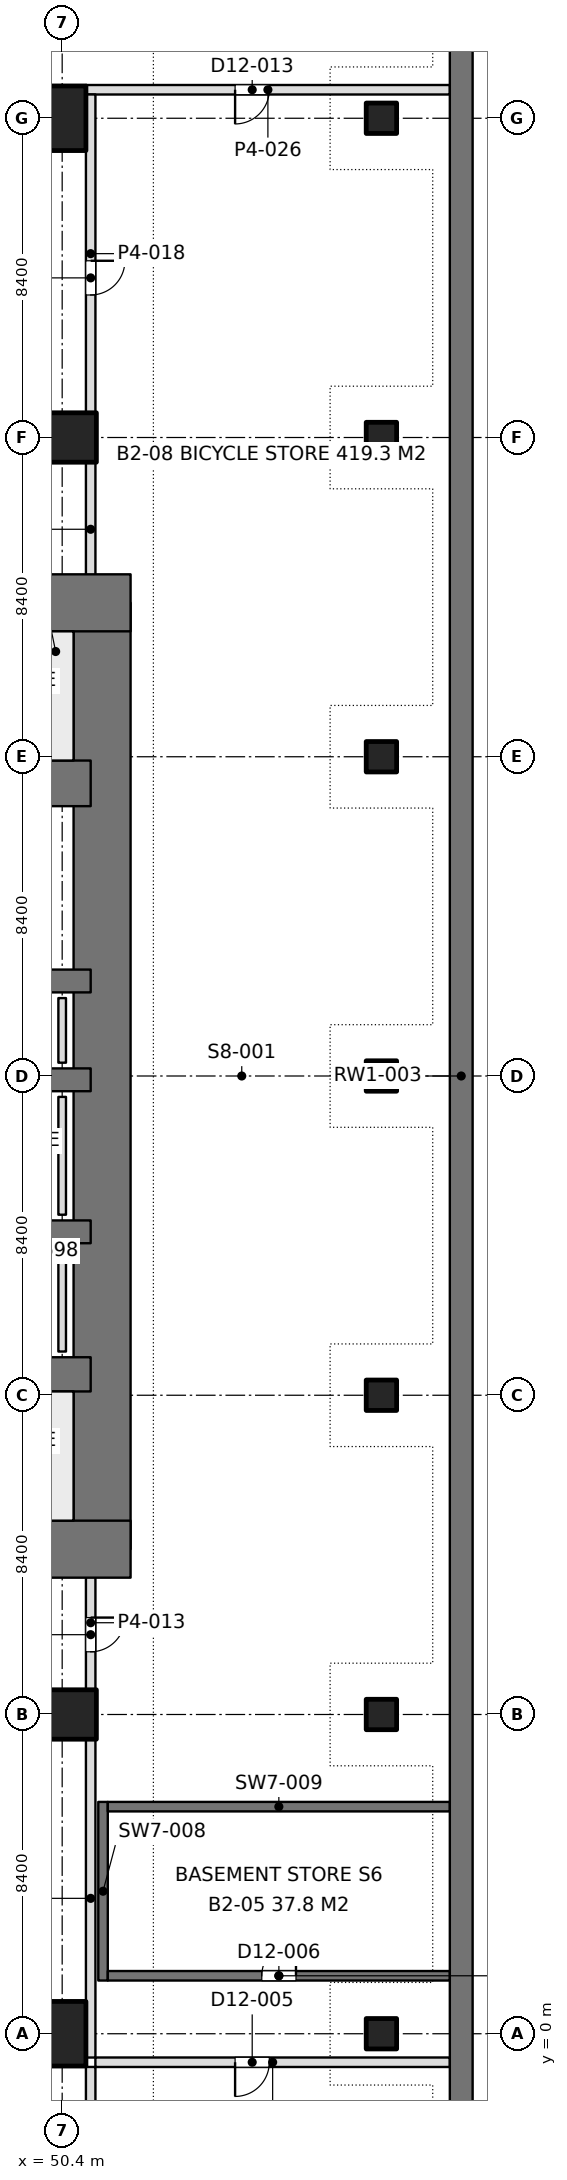
"""IFC4 building model, lengths in metres.
Left out: names, types, materials, properties, quantities, classifications, styles, units other than length and angle.
Written with IfcOpenShell. Run it as: python <this file> out.ifc"""

import sys

from ifc_helpers import new_model, si_unit, direction, frame, frame_2d, origin, origin_2d, place, context, subcontext, project, spatial, rectangle, extrude, element, fill, save


model = new_model("IFC4")
c1 = context("Model", 3, precision=1e-05, world=origin(), true_north=direction((0.0, 1.0)))
c2 = subcontext(c1, "Body", "Model", "MODEL_VIEW")
j1 = project(units=[si_unit("LENGTHUNIT", "METRE"), si_unit("PLANEANGLEUNIT", "RADIAN")], contexts=[c1])
p1 = place(None, origin())
s1 = spatial("IfcSite", under=j1, at=p1, CompositionType="ELEMENT")
p2 = place(p1, origin())
s2 = spatial("IfcBuilding", under=s1, at=p2, CompositionType="ELEMENT")
p3 = place(p2, frame((0.0, 0.0, -8.4)))
s3 = spatial("IfcBuildingStorey", under=s2, at=p3, CompositionType="ELEMENT", Elevation=-8.4)
p4 = place(p3, frame((60.9, -10.5, 0.0), z_axis=(0.0, 0.0, 1.0), x_axis=(0.0, 1.0, 0.0)))
e1 = element("IfcWall", 1, at=p4, inside=s3, PredefinedType="SOLIDWALL", context=c2, shape_type="SweptSolid", body=[
    extrude(rectangle(XDim=71.4, YDim=0.6, at=frame_2d((35.7, 0.0))), origin(), (0.0, 0.0, 1.0), 4.2),
])
p5 = place(p3, frame((50.4, 0.0, 0.0), z_axis=(0.0, 0.0, 1.0), x_axis=(1.0, 0.0, 0.0)))
e2 = element("IfcColumn", 2, at=p5, inside=s3, PredefinedType="COLUMN", context=c2, shape_type="SweptSolid", body=[
    extrude(rectangle(XDim=1.25, YDim=1.7, at=origin_2d()), origin(), (0.0, 0.0, 1.0), 4.2),
])
for number, where, z_axis, x_axis in (
    (3, (50.4, 8.4, 0.0), (0.0, 0.0, 1.0), (0.0, 1.0, 0.0)),
    (4, (50.4, 42.0, 0.0), (0.0, 0.0, 1.0), (0.0, 1.0, 0.0)),
):
    element("IfcColumn", number, at=place(p3, frame(where, z_axis=z_axis, x_axis=x_axis)), inside=s3, PredefinedType="COLUMN", context=c2, shape_type="SweptSolid", body=[
        extrude(rectangle(XDim=1.3, YDim=1.8, at=origin_2d()), origin(), (0.0, 0.0, 1.0), 4.2),
    ])
p6 = place(p3, frame((50.4, 50.4, 0.0), z_axis=(0.0, 0.0, 1.0), x_axis=(1.0, 0.0, 0.0)))
e5 = element("IfcColumn", 5, at=p6, inside=s3, PredefinedType="COLUMN", context=c2, shape_type="SweptSolid", body=[
    extrude(rectangle(XDim=1.25, YDim=1.7, at=origin_2d()), origin(), (0.0, 0.0, 1.0), 4.2),
])
for number, where, z_axis, x_axis in (
    (6, (58.8, 0.0, 0.0), (0.0, 0.0, 1.0), (1.0, 0.0, 0.0)),
    (7, (58.8, 8.4, 0.0), (0.0, 0.0, 1.0), (1.0, 0.0, 0.0)),
    (8, (58.8, 16.8, 0.0), (0.0, 0.0, 1.0), (1.0, 0.0, 0.0)),
    (9, (58.8, 25.2, 0.0), (0.0, 0.0, 1.0), (1.0, 0.0, 0.0)),
    (10, (58.8, 33.6, 0.0), (0.0, 0.0, 1.0), (1.0, 0.0, 0.0)),
    (11, (58.8, 42.0, 0.0), (0.0, 0.0, 1.0), (1.0, 0.0, 0.0)),
    (12, (58.8, 50.4, 0.0), (0.0, 0.0, 1.0), (1.0, 0.0, 0.0)),
):
    element("IfcColumn", number, at=place(p3, frame(where, z_axis=z_axis, x_axis=x_axis)), inside=s3, PredefinedType="COLUMN", context=c2, shape_type="SweptSolid", body=[
        extrude(rectangle(XDim=0.8, YDim=0.8, at=origin_2d()), origin(), (0.0, 0.0, 1.0), 4.2),
    ])
p7 = place(p3, frame((33.0, 12.75, 0.0), z_axis=(0.0, 0.0, 1.0), x_axis=(1.0, 0.0, 0.0)))
e13 = element("IfcWall", 13, at=p7, inside=s3, PredefinedType="SHEAR", context=c2, shape_type="SweptSolid", body=[
    extrude(rectangle(XDim=19.2, YDim=1.5, at=frame_2d((9.6, 0.0))), origin(), (0.0, 0.0, 1.0), 4.2),
])
p8 = place(p7, frame((7.85, 0.0, 0.0)))
e14 = element("IfcOpeningElement", 14, at=p8, cuts=e13, PredefinedType="OPENING", context=c2, shape_type="SweptSolid", body=[
    extrude(rectangle(XDim=1.8, YDim=2.4, at=frame_2d((0.9, 1.2))), frame((0.0, 0.76, 0.0), z_axis=(0.0, -1.0, 0.0), x_axis=(1.0, 0.0, 0.0)), (0.0, 0.0, 1.0), 1.52),
])
p9 = place(p3, frame((33.0, 37.65, 0.0), z_axis=(0.0, 0.0, 1.0), x_axis=(1.0, 0.0, 0.0)))
e15 = element("IfcWall", 15, at=p9, inside=s3, PredefinedType="SHEAR", context=c2, shape_type="SweptSolid", body=[
    extrude(rectangle(XDim=19.2, YDim=1.5, at=frame_2d((9.6, 0.0))), origin(), (0.0, 0.0, 1.0), 4.2),
])
p10 = place(p9, frame((7.85, 0.0, 0.0)))
e16 = element("IfcOpeningElement", 16, at=p10, cuts=e15, PredefinedType="OPENING", context=c2, shape_type="SweptSolid", body=[
    extrude(rectangle(XDim=1.8, YDim=2.4, at=frame_2d((0.9, 1.2))), frame((0.0, 0.76, 0.0), z_axis=(0.0, -1.0, 0.0), x_axis=(1.0, 0.0, 0.0)), (0.0, 0.0, 1.0), 1.52),
])
p11 = place(p3, frame((51.45, 12.75, 0.0), z_axis=(0.0, 0.0, 1.0), x_axis=(0.0, 1.0, 0.0)))
e17 = element("IfcWall", 17, at=p11, inside=s3, PredefinedType="SHEAR", context=c2, shape_type="SweptSolid", body=[
    extrude(rectangle(XDim=24.9, YDim=1.5, at=frame_2d((12.45, 0.0))), origin(), (0.0, 0.0, 1.0), 4.2),
])
p12 = place(p3, frame((51.15, 17.35, 0.0), z_axis=(0.0, 0.0, 1.0), x_axis=(-1.0, 0.0, 0.0)))
e18 = element("IfcWall", 18, at=p12, inside=s3, PredefinedType="SHEAR", context=c2, shape_type="SweptSolid", body=[
    extrude(rectangle(XDim=7.65, YDim=0.9, at=frame_2d((3.825, 0.0))), origin(), (0.0, 0.0, 1.0), 4.2),
])
for number, where, z_axis, x_axis in (
    (19, (51.15, 21.1, 0.0), (0.0, 0.0, 1.0), (-1.0, 0.0, 0.0)),
    (20, (51.15, 25.1, 0.0), (0.0, 0.0, 1.0), (-1.0, 0.0, 0.0)),
    (21, (51.15, 27.7, 0.0), (0.0, 0.0, 1.0), (-1.0, 0.0, 0.0)),
):
    element("IfcWall", number, at=place(p3, frame(where, z_axis=z_axis, x_axis=x_axis)), inside=s3, PredefinedType="SHEAR", context=c2, shape_type="SweptSolid", body=[
        extrude(rectangle(XDim=7.65, YDim=0.6, at=frame_2d((3.825, 0.0))), origin(), (0.0, 0.0, 1.0), 4.2),
    ])
p13 = place(p3, frame((51.15, 32.9, 0.0), z_axis=(0.0, 0.0, 1.0), x_axis=(-1.0, 0.0, 0.0)))
e22 = element("IfcWall", 22, at=p13, inside=s3, PredefinedType="SHEAR", context=c2, shape_type="SweptSolid", body=[
    extrude(rectangle(XDim=4.45, YDim=1.2, at=frame_2d((2.225, 0.0))), origin(), (0.0, 0.0, 1.0), 4.2),
])
p14 = place(p3, frame((51.274, -0.75, 0.0), z_axis=(0.0, 0.0, 1.0), x_axis=(1.0, 0.0, 0.0)))
e23 = element("IfcWall", 23, at=p14, inside=s3, PredefinedType="PARTITIONING", context=c2, shape_type="SweptSolid", body=[
    extrude(rectangle(XDim=9.328, YDim=0.25, at=frame_2d((4.664, 0.0))), origin(), (0.0, 0.0, 1.0), 3.85),
])
p15 = place(p14, frame((3.676, 0.0, 0.0)))
e24 = element("IfcOpeningElement", 24, at=p15, cuts=e23, PredefinedType="OPENING", context=c2, shape_type="SweptSolid", body=[
    extrude(rectangle(XDim=0.9, YDim=2.2, at=frame_2d((0.45, 1.1))), frame((0.0, 0.135, 0.0), z_axis=(0.0, -1.0, 0.0), x_axis=(1.0, 0.0, 0.0)), (0.0, 0.0, 1.0), 0.27),
])
p16 = place(p3, frame((51.024, 51.15, 0.0), z_axis=(0.0, 0.0, 1.0), x_axis=(1.0, 0.0, 0.0)))
e25 = element("IfcWall", 25, at=p16, inside=s3, PredefinedType="PARTITIONING", context=c2, shape_type="SweptSolid", body=[
    extrude(rectangle(XDim=9.578, YDim=0.25, at=frame_2d((4.789, 0.0))), origin(), (0.0, 0.0, 1.0), 3.85),
])
p17 = place(p16, frame((3.926, 0.0, 0.0)))
e26 = element("IfcOpeningElement", 26, at=p17, cuts=e25, PredefinedType="OPENING", context=c2, shape_type="SweptSolid", body=[
    extrude(rectangle(XDim=0.9, YDim=2.2, at=frame_2d((0.45, 1.1))), frame((0.0, 0.135, 0.0), z_axis=(0.0, -1.0, 0.0), x_axis=(1.0, 0.0, 0.0)), (0.0, 0.0, 1.0), 0.27),
])
p18 = place(p3, frame((51.15, -0.626, 0.0), z_axis=(0.0, 0.0, 1.0), x_axis=(0.0, 1.0, 0.0)))
e27 = element("IfcWall", 27, at=p18, inside=s3, PredefinedType="PARTITIONING", context=c2, shape_type="SweptSolid", body=[
    extrude(rectangle(XDim=8.377, YDim=0.25, at=frame_2d((4.188, 0.0))), origin(), (0.0, 0.0, 1.0), 3.85),
])
p19 = place(p3, frame((51.15, 9.049, 0.0), z_axis=(0.0, 0.0, 1.0), x_axis=(0.0, 1.0, 0.0)))
e28 = element("IfcWall", 28, at=p19, inside=s3, PredefinedType="PARTITIONING", context=c2, shape_type="SweptSolid", body=[
    extrude(rectangle(XDim=3.531, YDim=0.25, at=frame_2d((1.766, 0.0))), origin(), (0.0, 0.0, 1.0), 3.85),
])
p20 = place(p19, frame((1.001, 0.0, 0.0)))
e29 = element("IfcOpeningElement", 29, at=p20, cuts=e28, PredefinedType="OPENING", context=c2, shape_type="SweptSolid", body=[
    extrude(rectangle(XDim=0.9, YDim=2.2, at=frame_2d((0.45, 1.1))), frame((0.0, 0.135, 0.0), z_axis=(0.0, -1.0, 0.0), x_axis=(1.0, 0.0, 0.0)), (0.0, 0.0, 1.0), 0.27),
])
p21 = place(p3, frame((51.15, 37.82, 0.0), z_axis=(0.0, 0.0, 1.0), x_axis=(0.0, 1.0, 0.0)))
e30 = element("IfcWall", 30, at=p21, inside=s3, PredefinedType="PARTITIONING", context=c2, shape_type="SweptSolid", body=[
    extrude(rectangle(XDim=3.531, YDim=0.25, at=frame_2d((1.766, 0.0))), origin(), (0.0, 0.0, 1.0), 3.85),
])
p22 = place(p3, frame((51.15, 42.649, 0.0), z_axis=(0.0, 0.0, 1.0), x_axis=(0.0, 1.0, 0.0)))
e31 = element("IfcWall", 31, at=p22, inside=s3, PredefinedType="PARTITIONING", context=c2, shape_type="SweptSolid", body=[
    extrude(rectangle(XDim=8.377, YDim=0.25, at=frame_2d((4.188, 0.0))), origin(), (0.0, 0.0, 1.0), 3.85),
])
p23 = place(p22, frame((3.101, 0.0, 0.0)))
e32 = element("IfcOpeningElement", 32, at=p23, cuts=e31, PredefinedType="OPENING", context=c2, shape_type="SweptSolid", body=[
    extrude(rectangle(XDim=0.9, YDim=2.2, at=frame_2d((0.45, 1.1))), frame((0.0, 0.135, 0.0), z_axis=(0.0, -1.0, 0.0), x_axis=(1.0, 0.0, 0.0)), (0.0, 0.0, 1.0), 0.27),
])
p24 = place(p3, frame((51.15, -10.2, 0.0), z_axis=(0.0, 0.0, 1.0), x_axis=(0.0, 1.0, 0.0)))
e33 = element("IfcWall", 33, at=p24, inside=s3, PredefinedType="PARTITIONING", context=c2, shape_type="SweptSolid", body=[
    extrude(rectangle(XDim=9.326, YDim=0.25, at=frame_2d((4.663, 0.0))), origin(), (0.0, 0.0, 1.0), 3.85),
])
p25 = place(p24, frame((5.55, 0.0, 0.0)))
e34 = element("IfcOpeningElement", 34, at=p25, cuts=e33, PredefinedType="OPENING", context=c2, shape_type="SweptSolid", body=[
    extrude(rectangle(XDim=0.9, YDim=2.2, at=frame_2d((0.45, 1.1))), frame((0.0, 0.135, 0.0), z_axis=(0.0, -1.0, 0.0), x_axis=(1.0, 0.0, 0.0)), (0.0, 0.0, 1.0), 0.27),
])
p26 = place(p3, frame((50.4, 17.95, 0.0), z_axis=(0.0, 0.0, 1.0), x_axis=(0.0, 1.0, 0.0)))
e35 = element("IfcWall", 35, at=p26, inside=s3, PredefinedType="PLUMBINGWALL", context=c2, shape_type="SweptSolid", body=[
    extrude(rectangle(XDim=2.7, YDim=0.2, at=frame_2d((1.35, 0.0))), origin(), (0.0, 0.0, 1.0), 1.2),
])
p27 = place(p3, frame((50.4, 21.55, 0.0), z_axis=(0.0, 0.0, 1.0), x_axis=(0.0, 1.0, 0.0)))
e36 = element("IfcWall", 36, at=p27, inside=s3, PredefinedType="PLUMBINGWALL", context=c2, shape_type="SweptSolid", body=[
    extrude(rectangle(XDim=3.1, YDim=0.2, at=frame_2d((1.55, 0.0))), origin(), (0.0, 0.0, 1.0), 1.2),
])
p28 = place(p3, frame((50.4, 25.55, 0.0), z_axis=(0.0, 0.0, 1.0), x_axis=(0.0, 1.0, 0.0)))
e37 = element("IfcWall", 37, at=p28, inside=s3, PredefinedType="PLUMBINGWALL", context=c2, shape_type="SweptSolid", body=[
    extrude(rectangle(XDim=1.7, YDim=0.2, at=frame_2d((0.85, 0.0))), origin(), (0.0, 0.0, 1.0), 1.2),
])
p29 = place(p3, frame((60.602, 1.525, 0.0), z_axis=(0.0, 0.0, 1.0), x_axis=(-1.0, 0.0, 0.0)))
e38 = element("IfcWall", 38, at=p29, inside=s3, PredefinedType="SOLIDWALL", context=c2, shape_type="SweptSolid", body=[
    extrude(rectangle(XDim=9.002, YDim=0.25, at=frame_2d((4.501, 0.0))), origin(), (0.0, 0.0, 1.0), 4.2),
])
p30 = place(p29, frame((4.05, 0.0, 0.0)))
e39 = element("IfcOpeningElement", 39, at=p30, cuts=e38, PredefinedType="OPENING", context=c2, shape_type="SweptSolid", body=[
    extrude(rectangle(XDim=0.9, YDim=2.2, at=frame_2d((0.45, 1.1))), frame((0.0, 0.135, 0.0), z_axis=(0.0, -1.0, 0.0), x_axis=(1.0, 0.0, 0.0)), (0.0, 0.0, 1.0), 0.27),
])
p31 = place(p3, frame((60.602, 5.975, 0.0), z_axis=(0.0, 0.0, 1.0), x_axis=(-1.0, 0.0, 0.0)))
e40 = element("IfcWall", 40, at=p31, inside=s3, PredefinedType="SOLIDWALL", context=c2, shape_type="SweptSolid", body=[
    extrude(rectangle(XDim=9.002, YDim=0.25, at=frame_2d((4.501, 0.0))), origin(), (0.0, 0.0, 1.0), 4.2),
])
p32 = place(p3, frame((51.475, 1.4, 0.0), z_axis=(0.0, 0.0, 1.0), x_axis=(0.0, 1.0, 0.0)))
e41 = element("IfcWall", 41, at=p32, inside=s3, PredefinedType="SOLIDWALL", context=c2, shape_type="SweptSolid", body=[
    extrude(rectangle(XDim=4.7, YDim=0.25, at=frame_2d((2.35, 0.0))), origin(), (0.0, 0.0, 1.0), 4.2),
])
p33 = place(p15, frame((0.9, 0.0, 0.0), z_axis=(0.0, 0.0, 1.0), x_axis=(-1.0, 0.0, 0.0)))
e42 = element("IfcDoor", 42, at=p33, inside=s3, OperationType="SINGLE_SWING_RIGHT", PredefinedType="DOOR", context=c2, shape_type="SweptSolid", body=[
    extrude(rectangle(XDim=0.9, YDim=2.2, at=frame_2d((0.45, 1.1))), frame((0.0, 0.025, 0.0), z_axis=(0.0, -1.0, 0.0), x_axis=(1.0, 0.0, 0.0)), (0.0, 0.0, 1.0), 0.05),
])
fill(e24, e42)
p34 = place(p17, frame((0.9, 0.0, 0.0), z_axis=(0.0, 0.0, 1.0), x_axis=(-1.0, 0.0, 0.0)))
e43 = element("IfcDoor", 43, at=p34, inside=s3, OperationType="SINGLE_SWING_RIGHT", PredefinedType="DOOR", context=c2, shape_type="SweptSolid", body=[
    extrude(rectangle(XDim=0.9, YDim=2.2, at=frame_2d((0.45, 1.1))), frame((0.0, 0.025, 0.0), z_axis=(0.0, -1.0, 0.0), x_axis=(1.0, 0.0, 0.0)), (0.0, 0.0, 1.0), 0.05),
])
fill(e26, e43)
p35 = place(p20, frame((0.9, 0.0, 0.0), z_axis=(0.0, 0.0, 1.0), x_axis=(-1.0, 0.0, 0.0)))
e44 = element("IfcDoor", 44, at=p35, inside=s3, OperationType="SINGLE_SWING_LEFT", PredefinedType="DOOR", context=c2, shape_type="SweptSolid", body=[
    extrude(rectangle(XDim=0.9, YDim=2.2, at=frame_2d((0.45, 1.1))), frame((0.0, 0.025, 0.0), z_axis=(0.0, -1.0, 0.0), x_axis=(1.0, 0.0, 0.0)), (0.0, 0.0, 1.0), 0.05),
])
fill(e29, e44)
p36 = place(p23, frame((0.9, 0.0, 0.0), z_axis=(0.0, 0.0, 1.0), x_axis=(-1.0, 0.0, 0.0)))
e45 = element("IfcDoor", 45, at=p36, inside=s3, OperationType="SINGLE_SWING_LEFT", PredefinedType="DOOR", context=c2, shape_type="SweptSolid", body=[
    extrude(rectangle(XDim=0.9, YDim=2.2, at=frame_2d((0.45, 1.1))), frame((0.0, 0.025, 0.0), z_axis=(0.0, -1.0, 0.0), x_axis=(1.0, 0.0, 0.0)), (0.0, 0.0, 1.0), 0.05),
])
fill(e32, e45)
p37 = place(p30, frame((0.9, 0.0, 0.0), z_axis=(0.0, 0.0, 1.0), x_axis=(-1.0, 0.0, 0.0)))
e46 = element("IfcDoor", 46, at=p37, inside=s3, OperationType="SINGLE_SWING_RIGHT", PredefinedType="DOOR", context=c2, shape_type="SweptSolid", body=[
    extrude(rectangle(XDim=0.9, YDim=2.2, at=frame_2d((0.45, 1.1))), frame((0.0, 0.025, 0.0), z_axis=(0.0, -1.0, 0.0), x_axis=(1.0, 0.0, 0.0)), (0.0, 0.0, 1.0), 0.05),
])
fill(e39, e46)
save(model, sys.argv[1])
